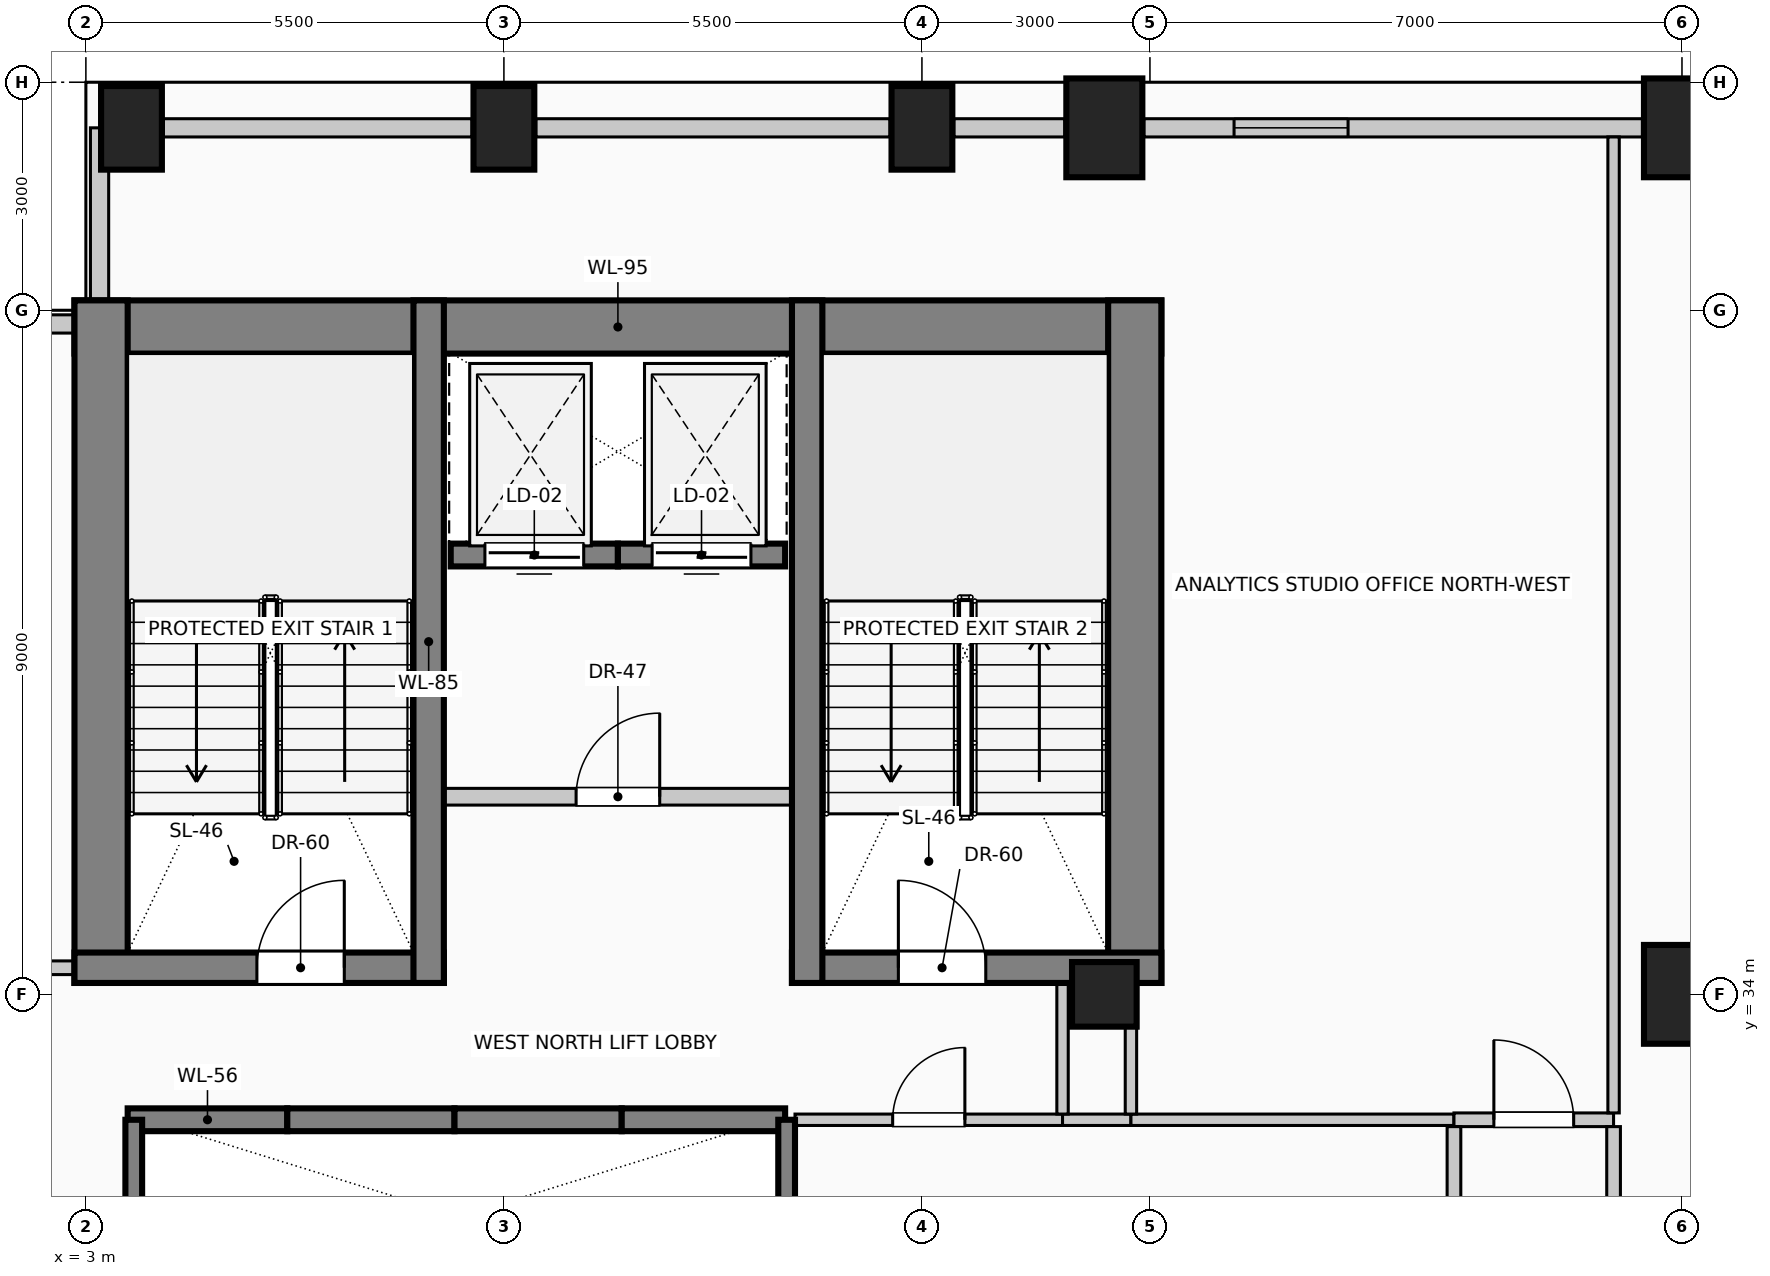
"""IFC4 building model, lengths in metres.
Left out: names, types, materials, properties, quantities, classifications, styles, units other than length and angle.
Written with IfcOpenShell. Run it as: python <this file> out.ifc"""

import sys

from ifc_helpers import new_model, si_unit, direction, frame, frame_2d, origin, origin_2d, place, context, subcontext, project, spatial, rectangle, circle, extrude, element, fill, save


model = new_model("IFC4")
c1 = context("Model", 3, precision=1e-05, world=origin(), true_north=direction((0.0, 1.0)))
c2 = subcontext(c1, "Body", "Model", "MODEL_VIEW")
j1 = project(units=[si_unit("LENGTHUNIT", "METRE"), si_unit("PLANEANGLEUNIT", "RADIAN")], contexts=[c1])
p1 = place(None, origin())
s1 = spatial("IfcSite", under=j1, at=p1, CompositionType="ELEMENT")
p2 = place(p1, origin())
s2 = spatial("IfcBuilding", under=s1, at=p2, CompositionType="ELEMENT")
p3 = place(p2, frame((0.0, 0.0, 210.6)))
s3 = spatial("IfcBuildingStorey", under=s2, at=p3, CompositionType="ELEMENT", Elevation=210.6)
p4 = place(p3, frame((2.85, 42.78, 0.0), z_axis=(0.0, 0.0, 1.0), x_axis=(1.0, 0.0, 0.0)))
e1 = element("IfcWall", 1, at=p4, inside=s3, PredefinedType="SHEAR", context=c2, shape_type="SweptSolid", body=[
    extrude(rectangle(XDim=14.3, YDim=0.7, at=frame_2d((7.15, 0.0))), origin(), (0.0, 0.0, 1.0), 4.0),
])
for number, where, z_axis, x_axis in (
    (2, (3.2, 34.15, 0.0), (0.0, 0.0, 1.0), (0.0, 1.0, 0.0)),
    (3, (16.8, 34.15, 0.0), (0.0, 0.0, 1.0), (0.0, 1.0, 0.0)),
):
    element("IfcWall", number, at=place(p3, frame(where, z_axis=z_axis, x_axis=x_axis)), inside=s3, PredefinedType="SHEAR", context=c2, shape_type="SweptSolid", body=[
        extrude(rectangle(XDim=8.98, YDim=0.7, at=frame_2d((4.49, 0.0))), origin(), (0.0, 0.0, 1.0), 4.0),
    ])
p5 = place(p3, frame((2.85, 34.35, 0.0), z_axis=(0.0, 0.0, 1.0), x_axis=(1.0, 0.0, 0.0)))
e4 = element("IfcWall", 4, at=p5, inside=s3, PredefinedType="SHEAR", context=c2, shape_type="SweptSolid", body=[
    extrude(rectangle(XDim=4.86, YDim=0.4, at=frame_2d((2.43, 0.0))), origin(), (0.0, 0.0, 1.0), 4.0),
])
p6 = place(p5, frame((2.4, 0.0, 0.0)))
e5 = element("IfcOpeningElement", 5, at=p6, cuts=e4, PredefinedType="OPENING", context=c2, shape_type="SweptSolid", body=[
    extrude(rectangle(XDim=1.15, YDim=2.2, at=frame_2d((0.575, 1.1))), frame((0.0, 0.21, 0.0), z_axis=(0.0, -1.0, 0.0), x_axis=(1.0, 0.0, 0.0)), (0.0, 0.0, 1.0), 0.42),
])
p7 = place(p3, frame((12.29, 34.35, 0.0), z_axis=(0.0, 0.0, 1.0), x_axis=(1.0, 0.0, 0.0)))
e6 = element("IfcWall", 6, at=p7, inside=s3, PredefinedType="SHEAR", context=c2, shape_type="SweptSolid", body=[
    extrude(rectangle(XDim=4.86, YDim=0.4, at=frame_2d((2.43, 0.0))), origin(), (0.0, 0.0, 1.0), 4.0),
])
p8 = place(p7, frame((1.4, 0.0, 0.0)))
e7 = element("IfcOpeningElement", 7, at=p8, cuts=e6, PredefinedType="OPENING", context=c2, shape_type="SweptSolid", body=[
    extrude(rectangle(XDim=1.15, YDim=2.2, at=frame_2d((0.575, 1.1))), frame((0.0, 0.21, 0.0), z_axis=(0.0, -1.0, 0.0), x_axis=(1.0, 0.0, 0.0)), (0.0, 0.0, 1.0), 0.42),
])
for number, where, z_axis, x_axis in (
    (8, (7.51, 34.15, 0.0), (0.0, 0.0, 1.0), (0.0, 1.0, 0.0)),
    (9, (12.49, 34.15, 0.0), (0.0, 0.0, 1.0), (0.0, 1.0, 0.0)),
):
    element("IfcWall", number, at=place(p3, frame(where, z_axis=z_axis, x_axis=x_axis)), inside=s3, PredefinedType="SHEAR", context=c2, shape_type="SweptSolid", body=[
        extrude(rectangle(XDim=8.98, YDim=0.4, at=frame_2d((4.49, 0.0))), origin(), (0.0, 0.0, 1.0), 4.0),
    ])
for number, where, z_axis, x_axis in (
    (10, (3.6, 45.4, 0.0), (0.0, 0.0, 1.0), (1.0, 0.0, 0.0)),
    (11, (8.5, 45.4, 0.0), (0.0, 0.0, 1.0), (1.0, 0.0, 0.0)),
    (12, (14.0, 45.4, 0.0), (0.0, 0.0, 1.0), (1.0, 0.0, 0.0)),
):
    element("IfcColumn", number, at=place(p3, frame(where, z_axis=z_axis, x_axis=x_axis)), inside=s3, PredefinedType="COLUMN", context=c2, shape_type="SweptSolid", body=[
        extrude(rectangle(XDim=0.8, YDim=1.1, at=origin_2d()), origin(), (0.0, 0.0, 1.0), 4.0),
    ])
for number, where, z_axis, x_axis in (
    (13, (16.4, 45.4, 0.0), (0.0, 0.0, 1.0), (1.0, 0.0, 0.0)),
    (14, (24.0, 45.4, 0.0), (0.0, 0.0, 1.0), (1.0, 0.0, 0.0)),
    (15, (24.0, 34.0, 0.0), (0.0, 0.0, 1.0), (1.0, 0.0, 0.0)),
):
    element("IfcColumn", number, at=place(p3, frame(where, z_axis=z_axis, x_axis=x_axis)), inside=s3, PredefinedType="COLUMN", context=c2, shape_type="SweptSolid", body=[
        extrude(rectangle(XDim=1.0, YDim=1.3, at=origin_2d()), origin(), (0.0, 0.0, 1.0), 4.0),
    ])
p9 = place(p3, frame((16.4, 34.0, 0.0), z_axis=(0.0, 0.0, 1.0), x_axis=(1.0, 0.0, 0.0)))
e16 = element("IfcColumn", 16, at=p9, inside=s3, PredefinedType="COLUMN", context=c2, shape_type="SweptSolid", body=[
    extrude(circle(Radius=0.425, at=origin_2d()), origin(), (0.0, 0.0, 1.0), 4.0),
])
p10 = place(p3, frame((4.02, 45.4, 0.0), z_axis=(0.0, 0.0, 1.0), x_axis=(1.0, 0.0, 0.0)))
e17 = element("IfcWall", 17, at=p10, inside=s3, PredefinedType="SOLIDWALL", context=c2, shape_type="SweptSolid", body=[
    extrude(rectangle(XDim=4.06, YDim=0.24, at=frame_2d((2.03, 0.0))), origin(), (0.0, 0.0, 1.0), 3.0),
])
p11 = place(p3, frame((8.92, 45.4, 0.0), z_axis=(0.0, 0.0, 1.0), x_axis=(1.0, 0.0, 0.0)))
e18 = element("IfcWall", 18, at=p11, inside=s3, PredefinedType="SOLIDWALL", context=c2, shape_type="SweptSolid", body=[
    extrude(rectangle(XDim=4.66, YDim=0.24, at=frame_2d((2.33, 0.0))), origin(), (0.0, 0.0, 1.0), 3.0),
])
p12 = place(p3, frame((14.42, 45.4, 0.0), z_axis=(0.0, 0.0, 1.0), x_axis=(1.0, 0.0, 0.0)))
e19 = element("IfcWall", 19, at=p12, inside=s3, PredefinedType="SOLIDWALL", context=c2, shape_type="SweptSolid", body=[
    extrude(rectangle(XDim=1.46, YDim=0.24, at=frame_2d((0.73, 0.0))), origin(), (0.0, 0.0, 1.0), 3.0),
])
p13 = place(p3, frame((16.92, 45.4, 0.0), z_axis=(0.0, 0.0, 1.0), x_axis=(1.0, 0.0, 0.0)))
e20 = element("IfcWall", 20, at=p13, inside=s3, PredefinedType="SOLIDWALL", context=c2, shape_type="SweptSolid", body=[
    extrude(rectangle(XDim=6.56, YDim=0.24, at=frame_2d((3.28, 0.0))), origin(), (0.0, 0.0, 1.0), 3.0),
])
p14 = place(p13, frame((1.187, 0.0, 0.42)))
e21 = element("IfcOpeningElement", 21, at=p14, cuts=e20, PredefinedType="OPENING", context=c2, shape_type="SweptSolid", body=[
    extrude(rectangle(XDim=1.5, YDim=2.2, at=frame_2d((0.75, 1.1))), frame((0.0, 0.13, 0.0), z_axis=(0.0, -1.0, 0.0), x_axis=(1.0, 0.0, 0.0)), (0.0, 0.0, 1.0), 0.26),
])
p15 = place(p3, frame((0.6, 42.82, 0.0), z_axis=(0.0, 0.0, 1.0), x_axis=(1.0, 0.0, 0.0)))
e22 = element("IfcWall", 22, at=p15, inside=s3, PredefinedType="SOLIDWALL", context=c2, shape_type="SweptSolid", body=[
    extrude(rectangle(XDim=2.245, YDim=0.24, at=frame_2d((1.123, 0.0))), origin(), (0.0, 0.0, 1.0), 3.75),
])
p16 = place(p3, frame((3.18, 43.135, 0.0), z_axis=(0.0, 0.0, 1.0), x_axis=(0.0, 1.0, 0.0)))
e23 = element("IfcWall", 23, at=p16, inside=s3, PredefinedType="SOLIDWALL", context=c2, shape_type="SweptSolid", body=[
    extrude(rectangle(XDim=2.265, YDim=0.24, at=frame_2d((1.132, 0.0))), origin(), (0.0, 0.0, 1.0), 3.75),
])
p17 = place(p3, frame((3.55, 32.35, 0.0), z_axis=(0.0, 0.0, 1.0), x_axis=(1.0, 0.0, 0.0)))
e24 = element("IfcWall", 24, at=p17, inside=s3, PredefinedType="SOLIDWALL", context=c2, shape_type="SweptSolid", body=[
    extrude(rectangle(XDim=2.1, YDim=0.3, at=frame_2d((1.05, 0.0))), origin(), (0.0, 0.0, 1.0), 4.0),
])
p18 = place(p3, frame((5.65, 32.35, 0.0), z_axis=(0.0, 0.0, 1.0), x_axis=(1.0, 0.0, 0.0)))
e25 = element("IfcWall", 25, at=p18, inside=s3, PredefinedType="SOLIDWALL", context=c2, shape_type="SweptSolid", body=[
    extrude(rectangle(XDim=2.2, YDim=0.3, at=frame_2d((1.1, 0.0))), origin(), (0.0, 0.0, 1.0), 4.0),
])
p19 = place(p3, frame((7.85, 32.35, 0.0), z_axis=(0.0, 0.0, 1.0), x_axis=(1.0, 0.0, 0.0)))
e26 = element("IfcWall", 26, at=p19, inside=s3, PredefinedType="SOLIDWALL", context=c2, shape_type="SweptSolid", body=[
    extrude(rectangle(XDim=2.2, YDim=0.3, at=frame_2d((1.1, 0.0))), origin(), (0.0, 0.0, 1.0), 4.0),
])
p20 = place(p3, frame((10.05, 32.35, 0.0), z_axis=(0.0, 0.0, 1.0), x_axis=(1.0, 0.0, 0.0)))
e27 = element("IfcWall", 27, at=p20, inside=s3, PredefinedType="SOLIDWALL", context=c2, shape_type="SweptSolid", body=[
    extrude(rectangle(XDim=2.15, YDim=0.3, at=frame_2d((1.075, 0.0))), origin(), (0.0, 0.0, 1.0), 4.0),
])
p21 = place(p3, frame((10.0, 39.78, 0.0), z_axis=(0.0, 0.0, 1.0), x_axis=(-1.0, 0.0, 0.0)))
e28 = element("IfcWall", 28, at=p21, inside=s3, PredefinedType="SOLIDWALL", context=c2, shape_type="SweptSolid", body=[
    extrude(rectangle(XDim=2.2, YDim=0.3, at=frame_2d((1.1, 0.0))), origin(), (0.0, 0.0, 1.0), 4.0),
])
p22 = place(p21, frame((0.45, 0.0, 0.0)))
e29 = element("IfcOpeningElement", 29, at=p22, cuts=e28, PredefinedType="OPENING", context=c2, shape_type="SweptSolid", body=[
    extrude(rectangle(XDim=1.3, YDim=2.25, at=frame_2d((0.65, 1.125))), frame((0.0, 0.16, 0.0), z_axis=(0.0, -1.0, 0.0), x_axis=(1.0, 0.0, 0.0)), (0.0, 0.0, 1.0), 0.32),
])
p23 = place(p3, frame((12.2, 39.78, 0.0), z_axis=(0.0, 0.0, 1.0), x_axis=(-1.0, 0.0, 0.0)))
e30 = element("IfcWall", 30, at=p23, inside=s3, PredefinedType="SOLIDWALL", context=c2, shape_type="SweptSolid", body=[
    extrude(rectangle(XDim=2.2, YDim=0.3, at=frame_2d((1.1, 0.0))), origin(), (0.0, 0.0, 1.0), 4.0),
])
p24 = place(p23, frame((0.45, 0.0, 0.0)))
e31 = element("IfcOpeningElement", 31, at=p24, cuts=e30, PredefinedType="OPENING", context=c2, shape_type="SweptSolid", body=[
    extrude(rectangle(XDim=1.3, YDim=2.25, at=frame_2d((0.65, 1.125))), frame((0.0, 0.16, 0.0), z_axis=(0.0, -1.0, 0.0), x_axis=(1.0, 0.0, 0.0)), (0.0, 0.0, 1.0), 0.32),
])
p25 = place(p3, frame((3.63, 26.8, 0.0), z_axis=(0.0, 0.0, 1.0), x_axis=(0.0, 1.0, 0.0)))
e32 = element("IfcWall", 32, at=p25, inside=s3, PredefinedType="SOLIDWALL", context=c2, shape_type="SweptSolid", body=[
    extrude(rectangle(XDim=5.55, YDim=0.22, at=frame_2d((2.775, 0.0))), origin(), (0.0, 0.0, 1.0), 4.0),
])
p26 = place(p3, frame((12.22, 29.75, 0.0), z_axis=(0.0, 0.0, 1.0), x_axis=(0.0, 1.0, 0.0)))
e33 = element("IfcWall", 33, at=p26, inside=s3, PredefinedType="SOLIDWALL", context=c2, shape_type="SweptSolid", body=[
    extrude(rectangle(XDim=2.6, YDim=0.22, at=frame_2d((1.3, 0.0))), origin(), (0.0, 0.0, 1.0), 4.0),
])
p27 = place(p3, frame((7.51, 36.6, 0.0), z_axis=(0.0, 0.0, 1.0), x_axis=(1.0, 0.0, 0.0)))
e34 = element("IfcWall", 34, at=p27, inside=s3, PredefinedType="PARTITIONING", context=c2, shape_type="SweptSolid", body=[
    extrude(rectangle(XDim=4.98, YDim=0.22, at=frame_2d((2.49, 0.0))), origin(), (0.0, 0.0, 1.0), 3.75),
])
p28 = place(p27, frame((1.94, 0.0, 0.0)))
e35 = element("IfcOpeningElement", 35, at=p28, cuts=e34, PredefinedType="OPENING", context=c2, shape_type="SweptSolid", body=[
    extrude(rectangle(XDim=1.1, YDim=2.2, at=frame_2d((0.55, 1.1))), frame((0.0, 0.12, 0.0), z_axis=(0.0, -1.0, 0.0), x_axis=(1.0, 0.0, 0.0)), (0.0, 0.0, 1.0), 0.24),
])
p29 = place(p3, frame((12.33, 32.35, 0.0), z_axis=(0.0, 0.0, 1.0), x_axis=(1.0, 0.0, 0.0)))
e36 = element("IfcWall", 36, at=p29, inside=s3, PredefinedType="PARTITIONING", context=c2, shape_type="SweptSolid", body=[
    extrude(rectangle(XDim=3.52, YDim=0.15, at=frame_2d((1.76, 0.0))), origin(), (0.0, 0.0, 1.0), 3.75),
])
p30 = place(p29, frame((1.285, 0.0, 0.0)))
e37 = element("IfcOpeningElement", 37, at=p30, cuts=e36, PredefinedType="OPENING", context=c2, shape_type="SweptSolid", body=[
    extrude(rectangle(XDim=0.95, YDim=2.15, at=frame_2d((0.475, 1.075))), frame((0.0, 0.085, 0.0), z_axis=(0.0, -1.0, 0.0), x_axis=(1.0, 0.0, 0.0)), (0.0, 0.0, 1.0), 0.17),
])
p31 = place(p3, frame((15.85, 32.35, 0.0), z_axis=(0.0, 0.0, 1.0), x_axis=(1.0, 0.0, 0.0)))
e38 = element("IfcWall", 38, at=p31, inside=s3, PredefinedType="PARTITIONING", context=c2, shape_type="SweptSolid", body=[
    extrude(rectangle(XDim=0.9, YDim=0.15, at=frame_2d((0.45, 0.0))), origin(), (0.0, 0.0, 1.0), 3.75),
])
p32 = place(p3, frame((16.75, 32.35, 0.0), z_axis=(0.0, 0.0, 1.0), x_axis=(1.0, 0.0, 0.0)))
e39 = element("IfcWall", 39, at=p32, inside=s3, PredefinedType="PARTITIONING", context=c2, shape_type="SweptSolid", body=[
    extrude(rectangle(XDim=4.25, YDim=0.15, at=frame_2d((2.125, 0.0))), origin(), (0.0, 0.0, 1.0), 3.75),
])
p33 = place(p3, frame((21.0, 32.35, 0.0), z_axis=(0.0, 0.0, 1.0), x_axis=(1.0, 0.0, 0.0)))
e40 = element("IfcWall", 40, at=p33, inside=s3, PredefinedType="PARTITIONING", context=c2, shape_type="SweptSolid", body=[
    extrude(rectangle(XDim=2.1, YDim=0.18, at=frame_2d((1.05, 0.0))), origin(), (0.0, 0.0, 1.0), 3.75),
])
p34 = place(p33, frame((0.525, 0.0, 0.0)))
e41 = element("IfcOpeningElement", 41, at=p34, cuts=e40, PredefinedType="OPENING", context=c2, shape_type="SweptSolid", body=[
    extrude(rectangle(XDim=1.05, YDim=2.15, at=frame_2d((0.525, 1.075))), frame((0.0, 0.1, 0.0), z_axis=(0.0, -1.0, 0.0), x_axis=(1.0, 0.0, 0.0)), (0.0, 0.0, 1.0), 0.2),
])
p35 = place(p3, frame((1.15, 34.35, 0.0), z_axis=(0.0, 0.0, 1.0), x_axis=(1.0, 0.0, 0.0)))
e42 = element("IfcWall", 42, at=p35, inside=s3, PredefinedType="PARTITIONING", context=c2, shape_type="SweptSolid", body=[
    extrude(rectangle(XDim=1.7, YDim=0.18, at=frame_2d((0.85, 0.0))), origin(), (0.0, 0.0, 1.0), 3.75),
])
p36 = place(p3, frame((15.85, 32.425, 0.0), z_axis=(0.0, 0.0, 1.0), x_axis=(0.0, 1.0, 0.0)))
e43 = element("IfcWall", 43, at=p36, inside=s3, PredefinedType="PARTITIONING", context=c2, shape_type="SweptSolid", body=[
    extrude(rectangle(XDim=1.725, YDim=0.15, at=frame_2d((0.862, 0.0))), origin(), (0.0, 0.0, 1.0), 3.75),
])
p37 = place(p3, frame((16.75, 32.425, 0.0), z_axis=(0.0, 0.0, 1.0), x_axis=(0.0, 1.0, 0.0)))
e44 = element("IfcWall", 44, at=p37, inside=s3, PredefinedType="PARTITIONING", context=c2, shape_type="SweptSolid", body=[
    extrude(rectangle(XDim=1.15, YDim=0.15, at=frame_2d((0.575, 0.0))), origin(), (0.0, 0.0, 1.0), 3.75),
])
p38 = place(p3, frame((21.0, 28.675, 0.0), z_axis=(0.0, 0.0, 1.0), x_axis=(0.0, 1.0, 0.0)))
e45 = element("IfcWall", 45, at=p38, inside=s3, PredefinedType="PARTITIONING", context=c2, shape_type="SweptSolid", body=[
    extrude(rectangle(XDim=3.585, YDim=0.18, at=frame_2d((1.792, 0.0))), origin(), (0.0, 0.0, 1.0), 3.75),
])
p39 = place(p3, frame((23.1, 29.14, 0.0), z_axis=(0.0, 0.0, 1.0), x_axis=(0.0, 1.0, 0.0)))
e46 = element("IfcWall", 46, at=p39, inside=s3, PredefinedType="PARTITIONING", context=c2, shape_type="SweptSolid", body=[
    extrude(rectangle(XDim=3.12, YDim=0.18, at=frame_2d((1.56, 0.0))), origin(), (0.0, 0.0, 1.0), 3.75),
])
p40 = place(p3, frame((23.1, 32.44, 0.0), z_axis=(0.0, 0.0, 1.0), x_axis=(0.0, 1.0, 0.0)))
e47 = element("IfcWall", 47, at=p40, inside=s3, PredefinedType="PARTITIONING", context=c2, shape_type="SweptSolid", body=[
    extrude(rectangle(XDim=12.84, YDim=0.15, at=frame_2d((6.42, 0.0))), origin(), (0.0, 0.0, 1.0), 3.75),
])
p41 = place(p14, origin())
e48 = element("IfcWindow", 48, at=p41, inside=s3, PartitioningType="SINGLE_PANEL", PredefinedType="WINDOW", context=c2, shape_type="SweptSolid", body=[
    extrude(rectangle(XDim=1.5, YDim=2.2, at=frame_2d((0.75, 1.1))), frame((0.0, 0.03, 0.0), z_axis=(0.0, -1.0, 0.0), x_axis=(1.0, 0.0, 0.0)), (0.0, 0.0, 1.0), 0.06),
])
fill(e21, e48)
p42 = place(p22, origin())
e49 = element("IfcDoor", 49, at=p42, inside=s3, OperationType="SLIDING_TO_LEFT", PredefinedType="DOOR", context=c2, shape_type="SweptSolid", body=[
    extrude(rectangle(XDim=1.3, YDim=2.25, at=frame_2d((0.65, 1.125))), frame((0.0, 0.025, 0.0), z_axis=(0.0, -1.0, 0.0), x_axis=(1.0, 0.0, 0.0)), (0.0, 0.0, 1.0), 0.05),
])
fill(e29, e49)
p43 = place(p24, origin())
e50 = element("IfcDoor", 50, at=p43, inside=s3, OperationType="SLIDING_TO_RIGHT", PredefinedType="DOOR", context=c2, shape_type="SweptSolid", body=[
    extrude(rectangle(XDim=1.3, YDim=2.25, at=frame_2d((0.65, 1.125))), frame((0.0, 0.025, 0.0), z_axis=(0.0, -1.0, 0.0), x_axis=(1.0, 0.0, 0.0)), (0.0, 0.0, 1.0), 0.05),
])
fill(e31, e50)
p44 = place(p6, origin())
e51 = element("IfcDoor", 51, at=p44, inside=s3, OperationType="SINGLE_SWING_RIGHT", PredefinedType="DOOR", context=c2, shape_type="SweptSolid", body=[
    extrude(rectangle(XDim=1.15, YDim=2.2, at=frame_2d((0.575, 1.1))), frame((0.0, 0.025, 0.0), z_axis=(0.0, -1.0, 0.0), x_axis=(1.0, 0.0, 0.0)), (0.0, 0.0, 1.0), 0.05),
])
fill(e5, e51)
p45 = place(p8, origin())
e52 = element("IfcDoor", 52, at=p45, inside=s3, OperationType="SINGLE_SWING_LEFT", PredefinedType="DOOR", context=c2, shape_type="SweptSolid", body=[
    extrude(rectangle(XDim=1.15, YDim=2.2, at=frame_2d((0.575, 1.1))), frame((0.0, 0.025, 0.0), z_axis=(0.0, -1.0, 0.0), x_axis=(1.0, 0.0, 0.0)), (0.0, 0.0, 1.0), 0.05),
])
fill(e7, e52)
p46 = place(p28, origin())
e53 = element("IfcDoor", 53, at=p46, inside=s3, OperationType="SINGLE_SWING_RIGHT", PredefinedType="DOOR", context=c2, shape_type="SweptSolid", body=[
    extrude(rectangle(XDim=1.1, YDim=2.2, at=frame_2d((0.55, 1.1))), frame((0.0, 0.025, 0.0), z_axis=(0.0, -1.0, 0.0), x_axis=(1.0, 0.0, 0.0)), (0.0, 0.0, 1.0), 0.05),
])
fill(e35, e53)
p47 = place(p30, origin())
e54 = element("IfcDoor", 54, at=p47, inside=s3, OperationType="SINGLE_SWING_RIGHT", PredefinedType="DOOR", context=c2, shape_type="SweptSolid", body=[
    extrude(rectangle(XDim=0.95, YDim=2.15, at=frame_2d((0.475, 1.075))), frame((0.0, 0.025, 0.0), z_axis=(0.0, -1.0, 0.0), x_axis=(1.0, 0.0, 0.0)), (0.0, 0.0, 1.0), 0.05),
])
fill(e37, e54)
p48 = place(p34, origin())
e55 = element("IfcDoor", 55, at=p48, inside=s3, OperationType="SINGLE_SWING_LEFT", PredefinedType="DOOR", context=c2, shape_type="SweptSolid", body=[
    extrude(rectangle(XDim=1.05, YDim=2.15, at=frame_2d((0.525, 1.075))), frame((0.0, 0.025, 0.0), z_axis=(0.0, -1.0, 0.0), x_axis=(1.0, 0.0, 0.0)), (0.0, 0.0, 1.0), 0.05),
])
fill(e41, e55)
save(model, sys.argv[1])
